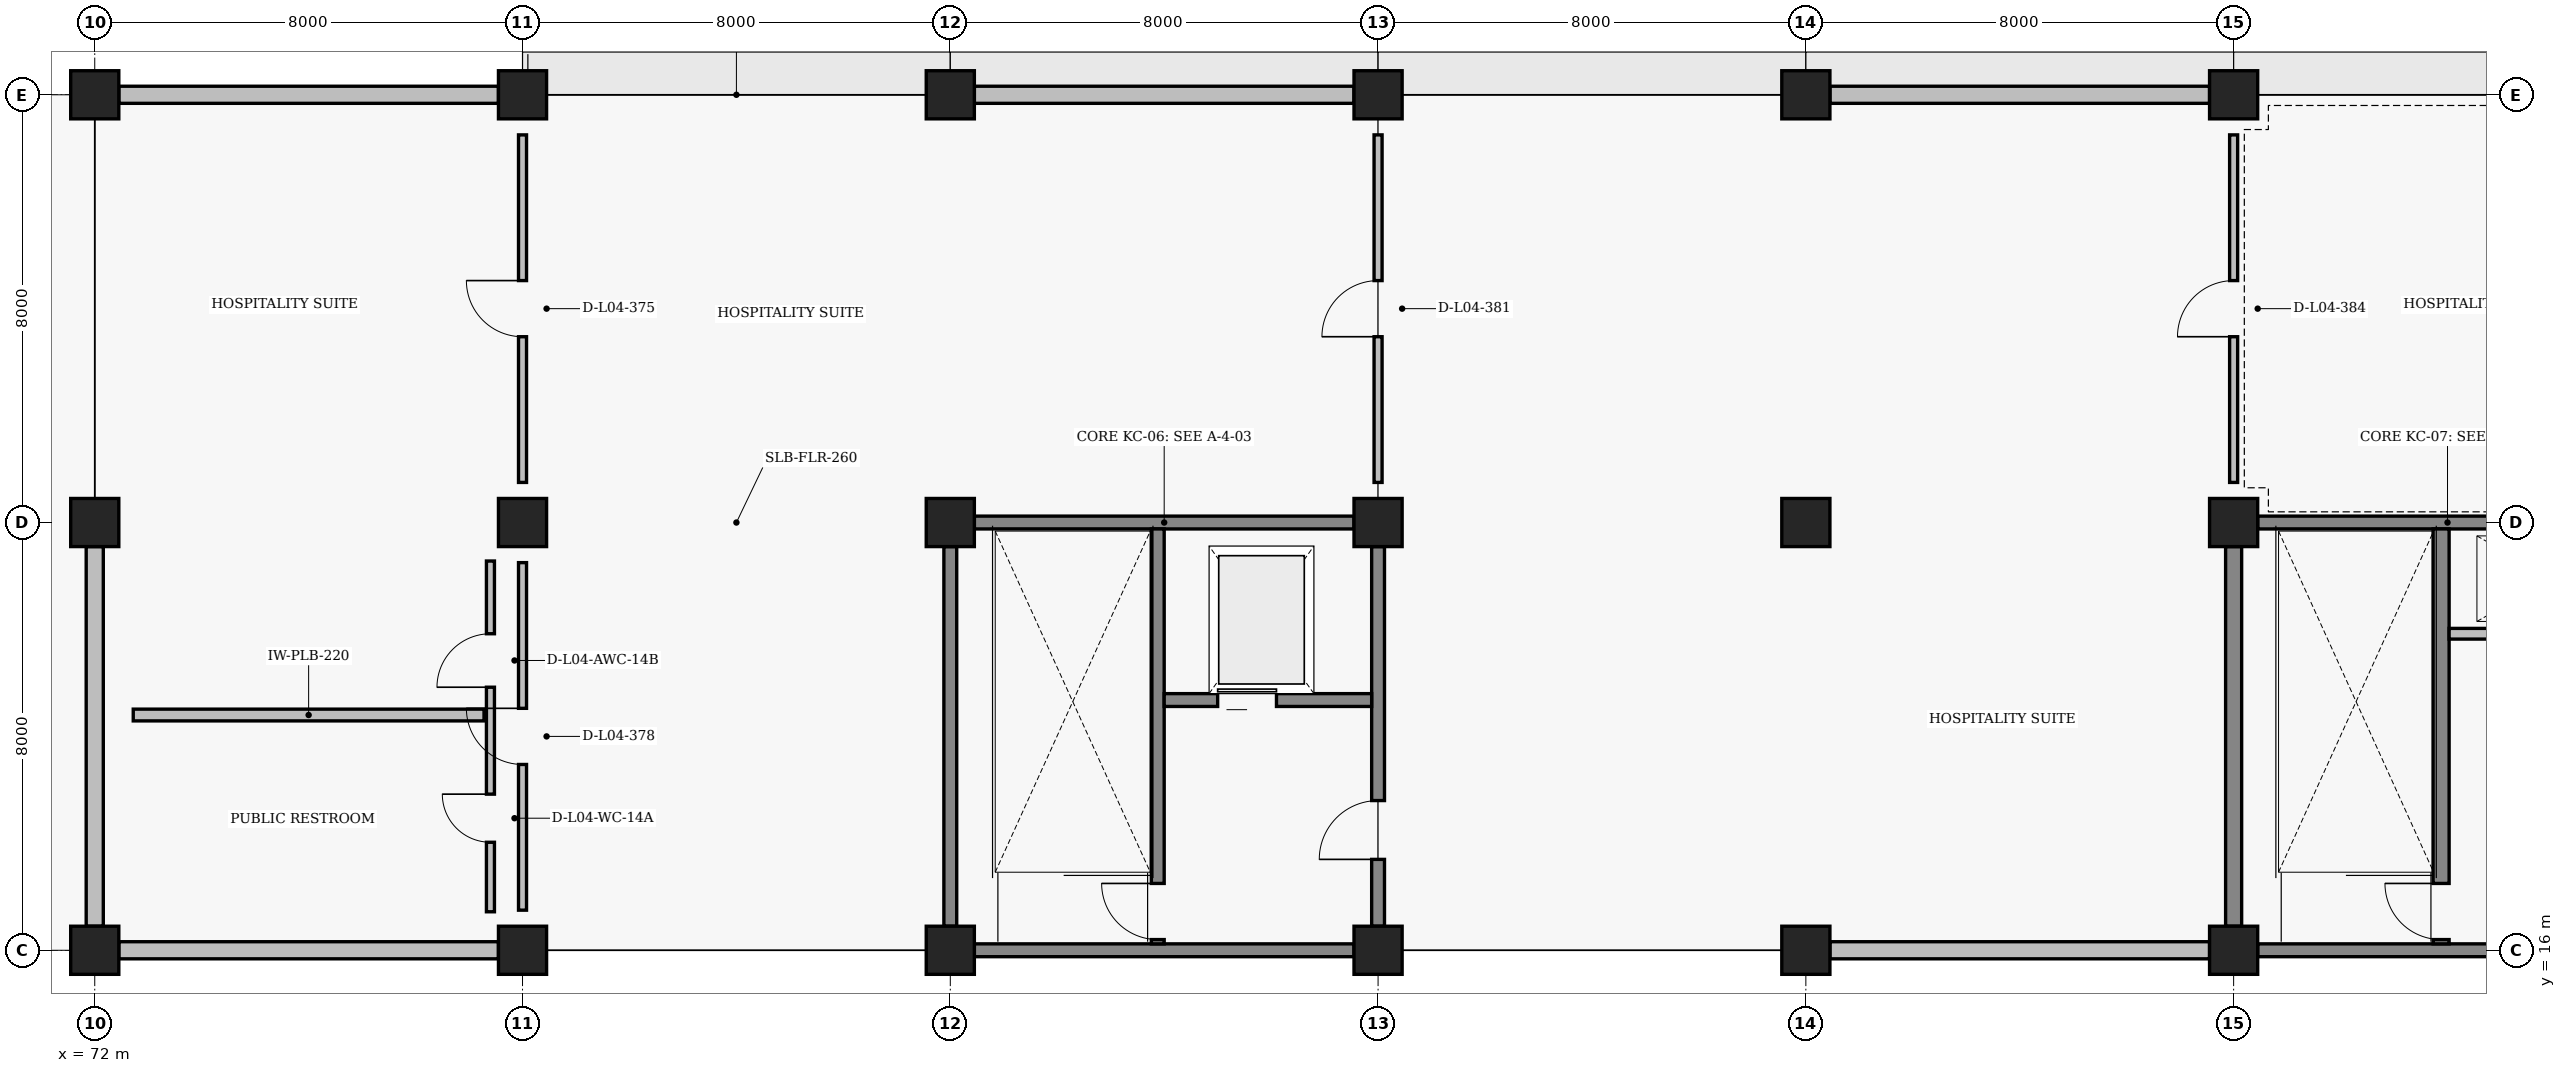
"""IFC4 building model, lengths in metres.
Left out: names, types, materials, properties, quantities, classifications, styles, units other than length and angle.
Written with IfcOpenShell. Run it as: python <this file> out.ifc"""

import sys

from ifc_helpers import new_model, si_unit, direction, frame, frame_2d, origin, origin_2d, place, context, subcontext, project, spatial, rectangle, extrude, element, fill, save


model = new_model("IFC4")
c1 = context("Model", 3, precision=1e-05, world=origin(), true_north=direction((0.0, 1.0)))
c2 = subcontext(c1, "Body", "Model", "MODEL_VIEW")
j1 = project(units=[si_unit("LENGTHUNIT", "METRE"), si_unit("PLANEANGLEUNIT", "RADIAN")], contexts=[c1])
p1 = place(None, origin())
s1 = spatial("IfcSite", under=j1, at=p1, CompositionType="ELEMENT")
p2 = place(p1, origin())
s2 = spatial("IfcBuilding", under=s1, at=p2, CompositionType="ELEMENT")
p3 = place(p2, frame((0.0, 0.0, 14.4)))
s3 = spatial("IfcBuildingStorey", under=s2, at=p3, CompositionType="ELEMENT", Elevation=14.4)
for number, where, z_axis, x_axis in (
    (1, (72.0, 16.0, 0.0), (0.0, 0.0, 1.0), (1.0, 0.0, 0.0)),
    (2, (72.0, 24.0, 0.0), (0.0, 0.0, 1.0), (1.0, 0.0, 0.0)),
    (3, (72.0, 32.0, 0.0), (0.0, 0.0, 1.0), (1.0, 0.0, 0.0)),
    (4, (80.0, 16.0, 0.0), (0.0, 0.0, 1.0), (1.0, 0.0, 0.0)),
    (5, (80.0, 24.0, 0.0), (0.0, 0.0, 1.0), (1.0, 0.0, 0.0)),
    (6, (80.0, 32.0, 0.0), (0.0, 0.0, 1.0), (1.0, 0.0, 0.0)),
    (7, (88.0, 16.0, 0.0), (0.0, 0.0, 1.0), (1.0, 0.0, 0.0)),
    (8, (88.0, 24.0, 0.0), (0.0, 0.0, 1.0), (1.0, 0.0, 0.0)),
    (9, (88.0, 32.0, 0.0), (0.0, 0.0, 1.0), (1.0, 0.0, 0.0)),
    (10, (96.0, 16.0, 0.0), (0.0, 0.0, 1.0), (1.0, 0.0, 0.0)),
    (11, (96.0, 24.0, 0.0), (0.0, 0.0, 1.0), (1.0, 0.0, 0.0)),
    (12, (96.0, 32.0, 0.0), (0.0, 0.0, 1.0), (1.0, 0.0, 0.0)),
    (13, (104.0, 16.0, 0.0), (0.0, 0.0, 1.0), (1.0, 0.0, 0.0)),
    (14, (104.0, 24.0, 0.0), (0.0, 0.0, 1.0), (1.0, 0.0, 0.0)),
    (15, (104.0, 32.0, 0.0), (0.0, 0.0, 1.0), (1.0, 0.0, 0.0)),
    (16, (112.0, 16.0, 0.0), (0.0, 0.0, 1.0), (1.0, 0.0, 0.0)),
    (17, (112.0, 24.0, 0.0), (0.0, 0.0, 1.0), (1.0, 0.0, 0.0)),
    (18, (112.0, 32.0, 0.0), (0.0, 0.0, 1.0), (1.0, 0.0, 0.0)),
):
    element("IfcColumn", number, at=place(p3, frame(where, z_axis=z_axis, x_axis=x_axis)), inside=s3, PredefinedType="COLUMN", context=c2, shape_type="SweptSolid", body=[
        extrude(rectangle(XDim=0.9, YDim=0.9, at=origin_2d()), origin(), (0.0, 0.0, 1.0), 4.2),
    ])
for number, where, z_axis, x_axis in (
    (19, (72.45, 16.0, 0.0), (0.0, 0.0, 1.0), (1.0, 0.0, 0.0)),
    (20, (72.0, 16.45, 0.0), (0.0, 0.0, 1.0), (0.0, 1.0, 0.0)),
):
    element("IfcWall", number, at=place(p3, frame(where, z_axis=z_axis, x_axis=x_axis)), inside=s3, PredefinedType="SOLIDWALL", context=c2, shape_type="SweptSolid", body=[
        extrude(rectangle(XDim=7.1, YDim=0.32, at=frame_2d((3.55, 0.0))), origin(), (0.0, 0.0, 1.0), 3.35),
    ])
p4 = place(p3, frame((72.45, 32.0, 0.0), z_axis=(0.0, 0.0, 1.0), x_axis=(1.0, 0.0, 0.0)))
e21 = element("IfcWall", 21, at=p4, inside=s3, PredefinedType="SOLIDWALL", context=c2, shape_type="SweptSolid", body=[
    extrude(rectangle(XDim=7.1, YDim=0.32, at=frame_2d((3.55, 0.0))), origin(), (0.0, 0.0, 1.0), 3.346),
])
p5 = place(p3, frame((88.45, 32.0, 0.0), z_axis=(0.0, 0.0, 1.0), x_axis=(1.0, 0.0, 0.0)))
e22 = element("IfcWall", 22, at=p5, inside=s3, PredefinedType="SOLIDWALL", context=c2, shape_type="SweptSolid", body=[
    extrude(rectangle(XDim=7.1, YDim=0.32, at=frame_2d((3.55, 0.0))), origin(), (0.0, 0.0, 1.0), 3.1),
])
p6 = place(p3, frame((104.45, 16.0, 0.0), z_axis=(0.0, 0.0, 1.0), x_axis=(1.0, 0.0, 0.0)))
e23 = element("IfcWall", 23, at=p6, inside=s3, PredefinedType="SOLIDWALL", context=c2, shape_type="SweptSolid", body=[
    extrude(rectangle(XDim=7.1, YDim=0.32, at=frame_2d((3.55, 0.0))), origin(), (0.0, 0.0, 1.0), 3.35),
])
p7 = place(p3, frame((104.45, 32.0, 0.0), z_axis=(0.0, 0.0, 1.0), x_axis=(1.0, 0.0, 0.0)))
e24 = element("IfcWall", 24, at=p7, inside=s3, PredefinedType="SOLIDWALL", context=c2, shape_type="SweptSolid", body=[
    extrude(rectangle(XDim=7.1, YDim=0.32, at=frame_2d((3.55, 0.0))), origin(), (0.0, 0.0, 1.0), 3.1),
])
for number, where, z_axis, x_axis in (
    (25, (88.45, 16.0, 0.0), (0.0, 0.0, 1.0), (1.0, 0.0, 0.0)),
    (26, (88.45, 24.0, 0.0), (0.0, 0.0, 1.0), (1.0, 0.0, 0.0)),
    (27, (88.0, 16.45, 0.0), (0.0, 0.0, 1.0), (0.0, 1.0, 0.0)),
):
    element("IfcWall", number, at=place(p3, frame(where, z_axis=z_axis, x_axis=x_axis)), inside=s3, PredefinedType="SHEAR", context=c2, shape_type="SweptSolid", body=[
        extrude(rectangle(XDim=7.1, YDim=0.24, at=frame_2d((3.55, 0.0))), origin(), (0.0, 0.0, 1.0), 3.37),
    ])
p8 = place(p3, frame((96.0, 16.45, 0.0), z_axis=(0.0, 0.0, 1.0), x_axis=(0.0, 1.0, 0.0)))
e28 = element("IfcWall", 28, at=p8, inside=s3, PredefinedType="SHEAR", context=c2, shape_type="SweptSolid", body=[
    extrude(rectangle(XDim=7.1, YDim=0.24, at=frame_2d((3.55, 0.0))), origin(), (0.0, 0.0, 1.0), 3.37),
])
p9 = place(p8, frame((1.25, 0.0, 0.0)))
e29 = element("IfcOpeningElement", 29, at=p9, cuts=e28, PredefinedType="OPENING", context=c2, shape_type="SweptSolid", body=[
    extrude(rectangle(XDim=1.1, YDim=2.2, at=frame_2d((0.55, 1.1))), frame((0.0, 0.13, 0.0), z_axis=(0.0, -1.0, 0.0), x_axis=(1.0, 0.0, 0.0)), (0.0, 0.0, 1.0), 0.26),
])
p10 = place(p3, frame((91.88, 16.12, 0.0), z_axis=(0.0, 0.0, 1.0), x_axis=(0.0, 1.0, 0.0)))
e30 = element("IfcWall", 30, at=p10, inside=s3, PredefinedType="SHEAR", context=c2, shape_type="SweptSolid", body=[
    extrude(rectangle(XDim=7.76, YDim=0.24, at=frame_2d((3.88, 0.0))), origin(), (0.0, 0.0, 1.0), 3.47),
])
p11 = place(p10, frame((0.08, 0.0, 0.0)))
e31 = element("IfcOpeningElement", 31, at=p11, cuts=e30, PredefinedType="OPENING", context=c2, shape_type="SweptSolid", body=[
    extrude(rectangle(XDim=1.05, YDim=2.15, at=frame_2d((0.525, 1.075))), frame((0.0, 0.13, 0.0), z_axis=(0.0, -1.0, 0.0), x_axis=(1.0, 0.0, 0.0)), (0.0, 0.0, 1.0), 0.26),
])
p12 = place(p3, frame((92.0, 20.68, 0.0), z_axis=(0.0, 0.0, 1.0), x_axis=(1.0, 0.0, 0.0)))
e32 = element("IfcWall", 32, at=p12, inside=s3, PredefinedType="SHEAR", context=c2, shape_type="SweptSolid", body=[
    extrude(rectangle(XDim=3.88, YDim=0.24, at=frame_2d((1.94, 0.0))), origin(), (0.0, 0.0, 1.0), 3.37),
])
p13 = place(p12, frame((1.0, 0.0, 0.0)))
e33 = element("IfcOpeningElement", 33, at=p13, cuts=e32, PredefinedType="OPENING", context=c2, shape_type="SweptSolid", body=[
    extrude(rectangle(XDim=1.1, YDim=2.15, at=frame_2d((0.55, 1.075))), frame((0.0, 0.13, 0.0), z_axis=(0.0, -1.0, 0.0), x_axis=(1.0, 0.0, 0.0)), (0.0, 0.0, 1.0), 0.26),
])
for number, where, z_axis, x_axis in (
    (34, (112.45, 16.0, 0.0), (0.0, 0.0, 1.0), (1.0, 0.0, 0.0)),
    (35, (112.45, 24.0, 0.0), (0.0, 0.0, 1.0), (1.0, 0.0, 0.0)),
):
    element("IfcWall", number, at=place(p3, frame(where, z_axis=z_axis, x_axis=x_axis)), inside=s3, PredefinedType="SHEAR", context=c2, shape_type="SweptSolid", body=[
        extrude(rectangle(XDim=7.1, YDim=0.24, at=frame_2d((3.55, 0.0))), origin(), (0.0, 0.0, 1.0), 3.37),
    ])
p14 = place(p3, frame((112.0, 16.45, 0.0), z_axis=(0.0, 0.0, 1.0), x_axis=(0.0, 1.0, 0.0)))
e36 = element("IfcWall", 36, at=p14, inside=s3, PredefinedType="SHEAR", context=c2, shape_type="SweptSolid", body=[
    extrude(rectangle(XDim=7.1, YDim=0.3, at=frame_2d((3.55, 0.0))), origin(), (0.0, 0.0, 1.0), 3.37),
])
p15 = place(p3, frame((115.88, 16.12, 0.0), z_axis=(0.0, 0.0, 1.0), x_axis=(0.0, 1.0, 0.0)))
e37 = element("IfcWall", 37, at=p15, inside=s3, PredefinedType="SHEAR", context=c2, shape_type="SweptSolid", body=[
    extrude(rectangle(XDim=7.76, YDim=0.3, at=frame_2d((3.88, 0.0))), origin(), (0.0, 0.0, 1.0), 3.47),
])
p16 = place(p15, frame((0.08, 0.0, 0.0)))
e38 = element("IfcOpeningElement", 38, at=p16, cuts=e37, PredefinedType="OPENING", context=c2, shape_type="SweptSolid", body=[
    extrude(rectangle(XDim=1.05, YDim=2.15, at=frame_2d((0.525, 1.075))), frame((0.0, 0.16, 0.0), z_axis=(0.0, -1.0, 0.0), x_axis=(1.0, 0.0, 0.0)), (0.0, 0.0, 1.0), 0.32),
])
p17 = place(p3, frame((116.03, 21.92, 0.0), z_axis=(0.0, 0.0, 1.0), x_axis=(1.0, 0.0, 0.0)))
e39 = element("IfcWall", 39, at=p17, inside=s3, PredefinedType="PARTITIONING", context=c2, shape_type="SweptSolid", body=[
    extrude(rectangle(XDim=3.82, YDim=0.2, at=frame_2d((1.91, 0.0))), origin(), (0.0, 0.0, 1.0), 3.37),
])
p18 = place(p17, frame((1.25, 0.0, 0.0)))
e40 = element("IfcOpeningElement", 40, at=p18, cuts=e39, PredefinedType="OPENING", context=c2, shape_type="SweptSolid", body=[
    extrude(rectangle(XDim=0.85, YDim=2.05, at=frame_2d((0.425, 1.025))), frame((0.0, 0.11, 0.0), z_axis=(0.0, -1.0, 0.0), x_axis=(1.0, 0.0, 0.0)), (0.0, 0.0, 1.0), 0.22),
])
p19 = place(p3, frame((72.72, 20.4, 0.0), z_axis=(0.0, 0.0, 1.0), x_axis=(1.0, 0.0, 0.0)))
e41 = element("IfcWall", 41, at=p19, inside=s3, PredefinedType="PLUMBINGWALL", context=c2, shape_type="SweptSolid", body=[
    extrude(rectangle(XDim=6.56, YDim=0.22, at=frame_2d((3.28, 0.0))), origin(), (0.0, 0.0, 1.0), 3.62),
])
p20 = place(p3, frame((79.4, 16.72, 0.0), z_axis=(0.0, 0.0, 1.0), x_axis=(0.0, 1.0, 0.0)))
e42 = element("IfcWall", 42, at=p20, inside=s3, PredefinedType="PARTITIONING", context=c2, shape_type="SweptSolid", body=[
    extrude(rectangle(XDim=6.56, YDim=0.15, at=frame_2d((3.28, 0.0))), origin(), (0.0, 0.0, 1.0), 3.62),
])
p21 = place(p20, frame((1.3, 0.0, 0.0)))
e43 = element("IfcOpeningElement", 43, at=p21, cuts=e42, PredefinedType="OPENING", context=c2, shape_type="SweptSolid", body=[
    extrude(rectangle(XDim=0.9, YDim=2.1, at=frame_2d((0.45, 1.05))), frame((0.0, 0.085, 0.0), z_axis=(0.0, -1.0, 0.0), x_axis=(1.0, 0.0, 0.0)), (0.0, 0.0, 1.0), 0.17),
])
p22 = place(p20, frame((4.2, 0.0, 0.0)))
e44 = element("IfcOpeningElement", 44, at=p22, cuts=e42, PredefinedType="OPENING", context=c2, shape_type="SweptSolid", body=[
    extrude(rectangle(XDim=1.0, YDim=2.15, at=frame_2d((0.5, 1.075))), frame((0.0, 0.085, 0.0), z_axis=(0.0, -1.0, 0.0), x_axis=(1.0, 0.0, 0.0)), (0.0, 0.0, 1.0), 0.17),
])
p23 = place(p3, frame((80.0, 24.75, 0.0), z_axis=(0.0, 0.0, 1.0), x_axis=(0.0, 1.0, 0.0)))
e45 = element("IfcWall", 45, at=p23, inside=s3, PredefinedType="PARTITIONING", context=c2, shape_type="SweptSolid", body=[
    extrude(rectangle(XDim=6.5, YDim=0.15, at=frame_2d((3.25, 0.0))), origin(), (0.0, 0.0, 1.0), 3.37),
])
p24 = place(p23, frame((2.725, 0.0, 0.0)))
e46 = element("IfcOpeningElement", 46, at=p24, cuts=e45, PredefinedType="OPENING", context=c2, shape_type="SweptSolid", body=[
    extrude(rectangle(XDim=1.05, YDim=2.15, at=frame_2d((0.525, 1.075))), frame((0.0, 0.085, 0.0), z_axis=(0.0, -1.0, 0.0), x_axis=(1.0, 0.0, 0.0)), (0.0, 0.0, 1.0), 0.17),
])
p25 = place(p3, frame((80.0, 16.75, 0.0), z_axis=(0.0, 0.0, 1.0), x_axis=(0.0, 1.0, 0.0)))
e47 = element("IfcWall", 47, at=p25, inside=s3, PredefinedType="PARTITIONING", context=c2, shape_type="SweptSolid", body=[
    extrude(rectangle(XDim=6.5, YDim=0.15, at=frame_2d((3.25, 0.0))), origin(), (0.0, 0.0, 1.0), 3.37),
])
p26 = place(p25, frame((2.725, 0.0, 0.0)))
e48 = element("IfcOpeningElement", 48, at=p26, cuts=e47, PredefinedType="OPENING", context=c2, shape_type="SweptSolid", body=[
    extrude(rectangle(XDim=1.05, YDim=2.15, at=frame_2d((0.525, 1.075))), frame((0.0, 0.085, 0.0), z_axis=(0.0, -1.0, 0.0), x_axis=(1.0, 0.0, 0.0)), (0.0, 0.0, 1.0), 0.17),
])
p27 = place(p3, frame((96.0, 24.75, 0.0), z_axis=(0.0, 0.0, 1.0), x_axis=(0.0, 1.0, 0.0)))
e49 = element("IfcWall", 49, at=p27, inside=s3, PredefinedType="PARTITIONING", context=c2, shape_type="SweptSolid", body=[
    extrude(rectangle(XDim=6.5, YDim=0.15, at=frame_2d((3.25, 0.0))), origin(), (0.0, 0.0, 1.0), 3.37),
])
p28 = place(p27, frame((2.725, 0.0, 0.0)))
e50 = element("IfcOpeningElement", 50, at=p28, cuts=e49, PredefinedType="OPENING", context=c2, shape_type="SweptSolid", body=[
    extrude(rectangle(XDim=1.05, YDim=2.15, at=frame_2d((0.525, 1.075))), frame((0.0, 0.085, 0.0), z_axis=(0.0, -1.0, 0.0), x_axis=(1.0, 0.0, 0.0)), (0.0, 0.0, 1.0), 0.17),
])
p29 = place(p3, frame((112.0, 24.75, 0.0), z_axis=(0.0, 0.0, 1.0), x_axis=(0.0, 1.0, 0.0)))
e51 = element("IfcWall", 51, at=p29, inside=s3, PredefinedType="PARTITIONING", context=c2, shape_type="SweptSolid", body=[
    extrude(rectangle(XDim=6.5, YDim=0.15, at=frame_2d((3.25, 0.0))), origin(), (0.0, 0.0, 1.0), 3.37),
])
p30 = place(p29, frame((2.725, 0.0, 0.0)))
e52 = element("IfcOpeningElement", 52, at=p30, cuts=e51, PredefinedType="OPENING", context=c2, shape_type="SweptSolid", body=[
    extrude(rectangle(XDim=1.05, YDim=2.15, at=frame_2d((0.525, 1.075))), frame((0.0, 0.085, 0.0), z_axis=(0.0, -1.0, 0.0), x_axis=(1.0, 0.0, 0.0)), (0.0, 0.0, 1.0), 0.17),
])
p31 = place(p9, origin())
e53 = element("IfcDoor", 53, at=p31, inside=s3, OperationType="SINGLE_SWING_LEFT", PredefinedType="DOOR", context=c2, shape_type="SweptSolid", body=[
    extrude(rectangle(XDim=1.1, YDim=2.2, at=frame_2d((0.55, 1.1))), frame((0.0, 0.025, 0.0), z_axis=(0.0, -1.0, 0.0), x_axis=(1.0, 0.0, 0.0)), (0.0, 0.0, 1.0), 0.05),
])
fill(e29, e53)
p32 = place(p11, origin())
e54 = element("IfcDoor", 54, at=p32, inside=s3, OperationType="SINGLE_SWING_RIGHT", PredefinedType="DOOR", context=c2, shape_type="SweptSolid", body=[
    extrude(rectangle(XDim=1.05, YDim=2.15, at=frame_2d((0.525, 1.075))), frame((0.0, 0.025, 0.0), z_axis=(0.0, -1.0, 0.0), x_axis=(1.0, 0.0, 0.0)), (0.0, 0.0, 1.0), 0.05),
])
fill(e31, e54)
p33 = place(p13, origin())
e55 = element("IfcDoor", 55, at=p33, inside=s3, OperationType="SLIDING_TO_LEFT", PredefinedType="DOOR", context=c2, shape_type="SweptSolid", body=[
    extrude(rectangle(XDim=1.1, YDim=2.15, at=frame_2d((0.55, 1.075))), frame((0.0, 0.025, 0.0), z_axis=(0.0, -1.0, 0.0), x_axis=(1.0, 0.0, 0.0)), (0.0, 0.0, 1.0), 0.05),
])
fill(e33, e55)
p34 = place(p16, origin())
e56 = element("IfcDoor", 56, at=p34, inside=s3, OperationType="SINGLE_SWING_RIGHT", PredefinedType="DOOR", context=c2, shape_type="SweptSolid", body=[
    extrude(rectangle(XDim=1.05, YDim=2.15, at=frame_2d((0.525, 1.075))), frame((0.0, 0.025, 0.0), z_axis=(0.0, -1.0, 0.0), x_axis=(1.0, 0.0, 0.0)), (0.0, 0.0, 1.0), 0.05),
])
fill(e38, e56)
p35 = place(p21, origin())
e57 = element("IfcDoor", 57, at=p35, inside=s3, OperationType="SINGLE_SWING_RIGHT", PredefinedType="DOOR", context=c2, shape_type="SweptSolid", body=[
    extrude(rectangle(XDim=0.9, YDim=2.1, at=frame_2d((0.45, 1.05))), frame((0.0, 0.025, 0.0), z_axis=(0.0, -1.0, 0.0), x_axis=(1.0, 0.0, 0.0)), (0.0, 0.0, 1.0), 0.05),
])
fill(e43, e57)
p36 = place(p22, origin())
e58 = element("IfcDoor", 58, at=p36, inside=s3, OperationType="SINGLE_SWING_LEFT", PredefinedType="DOOR", context=c2, shape_type="SweptSolid", body=[
    extrude(rectangle(XDim=1.0, YDim=2.15, at=frame_2d((0.5, 1.075))), frame((0.0, 0.025, 0.0), z_axis=(0.0, -1.0, 0.0), x_axis=(1.0, 0.0, 0.0)), (0.0, 0.0, 1.0), 0.05),
])
fill(e44, e58)
p37 = place(p24, origin())
e59 = element("IfcDoor", 59, at=p37, inside=s3, OperationType="SINGLE_SWING_RIGHT", PredefinedType="DOOR", context=c2, shape_type="SweptSolid", body=[
    extrude(rectangle(XDim=1.05, YDim=2.15, at=frame_2d((0.525, 1.075))), frame((0.0, 0.025, 0.0), z_axis=(0.0, -1.0, 0.0), x_axis=(1.0, 0.0, 0.0)), (0.0, 0.0, 1.0), 0.05),
])
fill(e46, e59)
p38 = place(p26, origin())
e60 = element("IfcDoor", 60, at=p38, inside=s3, OperationType="SINGLE_SWING_RIGHT", PredefinedType="DOOR", context=c2, shape_type="SweptSolid", body=[
    extrude(rectangle(XDim=1.05, YDim=2.15, at=frame_2d((0.525, 1.075))), frame((0.0, 0.025, 0.0), z_axis=(0.0, -1.0, 0.0), x_axis=(1.0, 0.0, 0.0)), (0.0, 0.0, 1.0), 0.05),
])
fill(e48, e60)
p39 = place(p28, origin())
e61 = element("IfcDoor", 61, at=p39, inside=s3, OperationType="SINGLE_SWING_LEFT", PredefinedType="DOOR", context=c2, shape_type="SweptSolid", body=[
    extrude(rectangle(XDim=1.05, YDim=2.15, at=frame_2d((0.525, 1.075))), frame((0.0, 0.025, 0.0), z_axis=(0.0, -1.0, 0.0), x_axis=(1.0, 0.0, 0.0)), (0.0, 0.0, 1.0), 0.05),
])
fill(e50, e61)
p40 = place(p30, origin())
e62 = element("IfcDoor", 62, at=p40, inside=s3, OperationType="SINGLE_SWING_LEFT", PredefinedType="DOOR", context=c2, shape_type="SweptSolid", body=[
    extrude(rectangle(XDim=1.05, YDim=2.15, at=frame_2d((0.525, 1.075))), frame((0.0, 0.025, 0.0), z_axis=(0.0, -1.0, 0.0), x_axis=(1.0, 0.0, 0.0)), (0.0, 0.0, 1.0), 0.05),
])
fill(e52, e62)
save(model, sys.argv[1])
